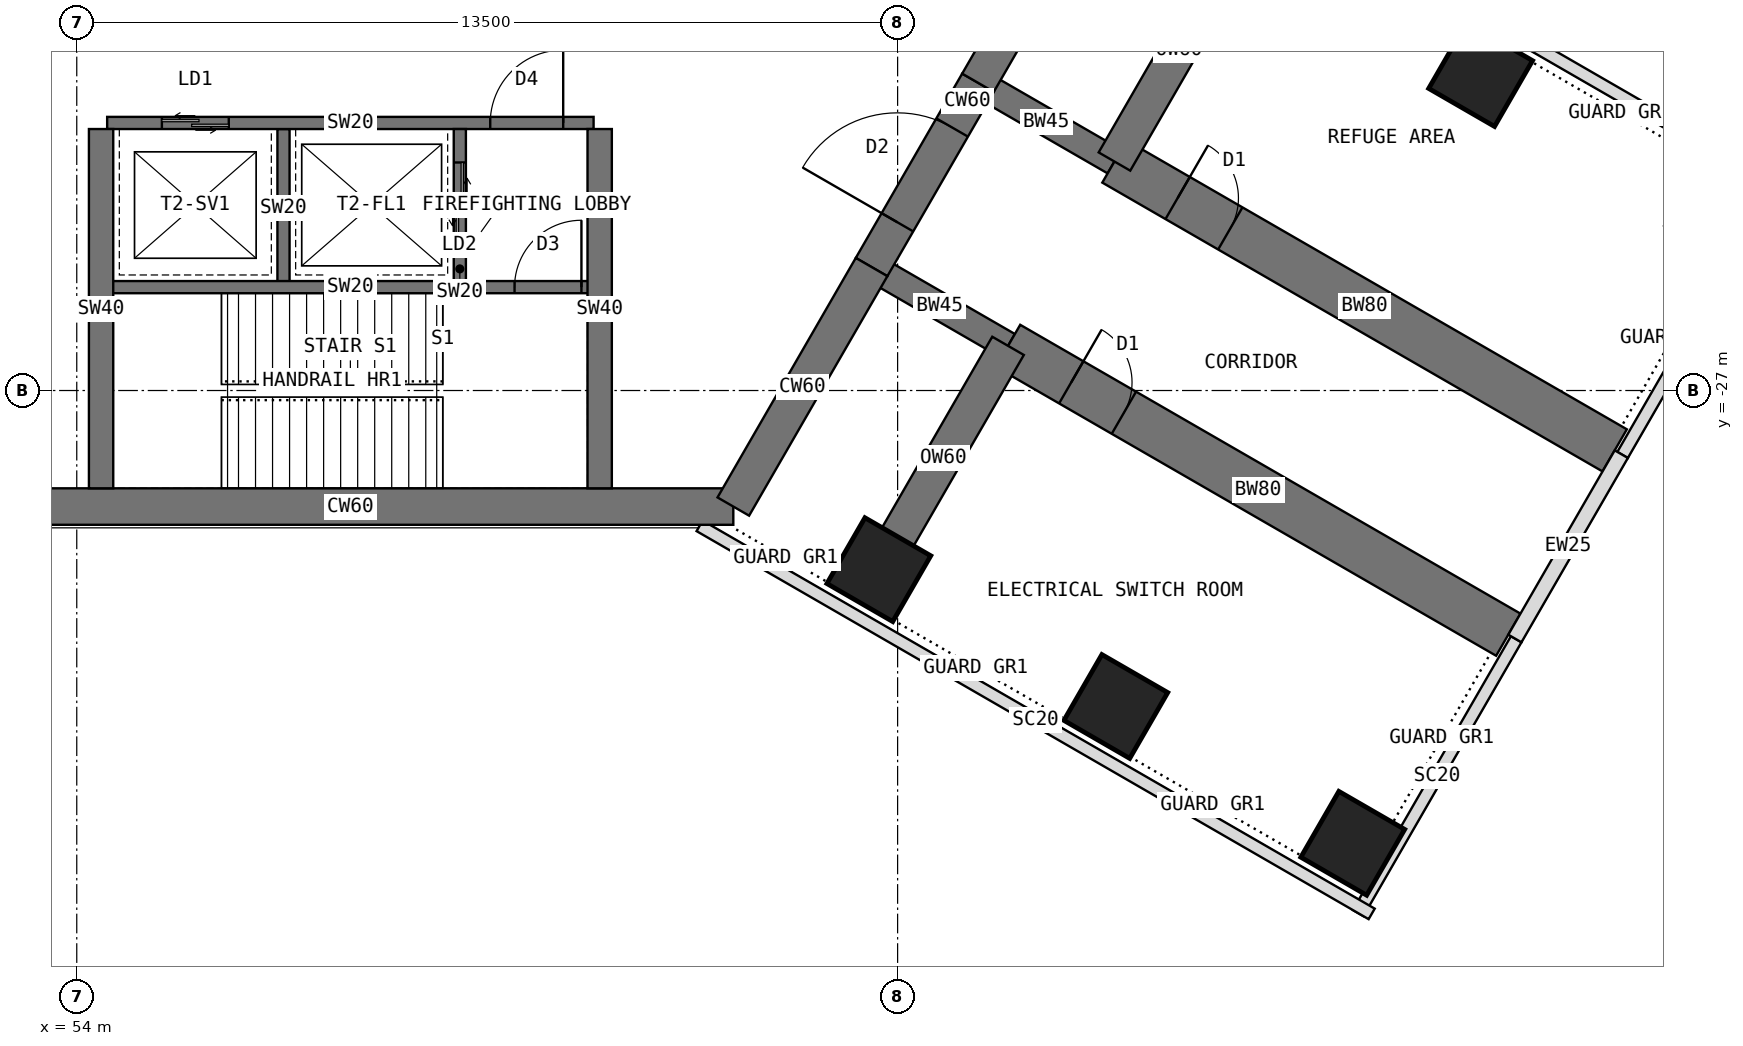
"""IFC4 building model, lengths in metres.
Left out: names, types, materials, properties, quantities, classifications, styles, units other than length and angle.
Written with IfcOpenShell. Run it as: python <this file> out.ifc"""

import sys

from ifc_helpers import new_model, si_unit, direction, frame, frame_2d, origin, origin_2d, place, context, subcontext, project, spatial, rectangle, extrude, element, fill, save


model = new_model("IFC4")
c1 = context("Model", 3, precision=1e-05, world=origin(), true_north=direction((0.0, 1.0)))
c2 = subcontext(c1, "Body", "Model", "MODEL_VIEW")
j1 = project(units=[si_unit("LENGTHUNIT", "METRE"), si_unit("PLANEANGLEUNIT", "RADIAN")], contexts=[c1])
p1 = place(None, origin())
s1 = spatial("IfcSite", under=j1, at=p1, CompositionType="ELEMENT")
p2 = place(p1, origin())
s2 = spatial("IfcBuilding", under=s1, at=p2, CompositionType="ELEMENT")
p3 = place(p2, frame((0.0, 0.0, 165.5)))
s3 = spatial("IfcBuildingStorey", under=s2, at=p3, CompositionType="ELEMENT", Elevation=165.5)
p4 = place(p3, frame((52.202, -28.908, 0.0), z_axis=(0.0, 0.0, 1.0), x_axis=(1.0, 0.0, 0.0)))
e1 = element("IfcWall", 1, at=p4, inside=s3, PredefinedType="SHEAR", context=c2, shape_type="SweptSolid", body=[
    extrude(rectangle(XDim=12.596, YDim=0.6, at=frame_2d((6.298, 0.0))), origin(), (0.0, 0.0, 1.0), 5.0),
])
p5 = place(p3, frame((64.798, -28.908, 0.0), z_axis=(0.0, 0.0, 1.0), x_axis=(0.499984222037, 0.866034513004, 0.0)))
e2 = element("IfcWall", 2, at=p5, inside=s3, PredefinedType="SHEAR", context=c2, shape_type="SweptSolid", body=[
    extrude(rectangle(XDim=4.548, YDim=0.6, at=frame_2d((2.274, 0.0))), origin(), (0.0, 0.0, 1.0), 5.0),
])
p6 = place(p3, frame((67.072, -24.97, 0.0), z_axis=(0.0, 0.0, 1.0), x_axis=(0.500010275428, 0.866019471182, 0.0)))
e3 = element("IfcWall", 3, at=p6, inside=s3, PredefinedType="SHEAR", context=c2, shape_type="SweptSolid", body=[
    extrude(rectangle(XDim=3.5, YDim=0.6, at=frame_2d((1.75, 0.0))), origin(), (0.0, 0.0, 1.0), 5.0),
])
p7 = place(p6, frame((0.85, 0.0, 0.0)))
e4 = element("IfcOpeningElement", 4, at=p7, cuts=e3, PredefinedType="OPENING", context=c2, shape_type="SweptSolid", body=[
    extrude(rectangle(XDim=1.8, YDim=2.1, at=frame_2d((0.9, 1.05))), frame((0.0, 0.31, 0.0), z_axis=(0.0, -1.0, 0.0), x_axis=(1.0, 0.0, 0.0)), (0.0, 0.0, 1.0), 0.62),
])
p8 = place(p3, frame((68.822, -21.939, 0.0), z_axis=(0.0, 0.0, 1.0), x_axis=(0.500024481964, 0.866011268655, 0.0)))
e5 = element("IfcWall", 5, at=p8, inside=s3, PredefinedType="SHEAR", context=c2, shape_type="SweptSolid", body=[
    extrude(rectangle(XDim=4.548, YDim=0.6, at=frame_2d((2.274, 0.0))), origin(), (0.0, 0.0, 1.0), 5.0),
])
p9 = place(p3, frame((68.822, -21.939, 0.0), z_axis=(0.0, 0.0, 1.0), x_axis=(0.866072649678, -0.499918158782, 0.0)))
e6 = element("IfcWall", 6, at=p9, inside=s3, PredefinedType="SHEAR", context=c2, shape_type="SweptSolid", body=[
    extrude(rectangle(XDim=2.592, YDim=0.45, at=frame_2d((1.296, 0.0))), origin(), (0.0, 0.0, 1.0), 5.0),
])
p10 = place(p3, frame((71.066, -23.234, 0.0), z_axis=(0.0, 0.0, 1.0), x_axis=(0.86602681393, -0.499997557548, 0.0)))
e7 = element("IfcWall", 7, at=p10, inside=s3, PredefinedType="SHEAR", context=c2, shape_type="SweptSolid", body=[
    extrude(rectangle(XDim=9.5, YDim=0.8, at=frame_2d((4.75, 0.0))), origin(), (0.0, 0.0, 1.0), 5.0),
])
p11 = place(p10, frame((1.2, 0.0, 0.0)))
e8 = element("IfcOpeningElement", 8, at=p11, cuts=e7, PredefinedType="OPENING", context=c2, shape_type="SweptSolid", body=[
    extrude(rectangle(XDim=1.0, YDim=2.1, at=frame_2d((0.5, 1.05))), frame((0.0, 0.41, 0.0), z_axis=(0.0, -1.0, 0.0), x_axis=(1.0, 0.0, 0.0)), (0.0, 0.0, 1.0), 0.82),
])
p12 = place(p3, frame((67.072, -24.97, 0.0), z_axis=(0.0, 0.0, 1.0), x_axis=(0.866031863473, -0.499988811324, 0.0)))
e9 = element("IfcWall", 9, at=p12, inside=s3, PredefinedType="SHEAR", context=c2, shape_type="SweptSolid", body=[
    extrude(rectangle(XDim=2.592, YDim=0.45, at=frame_2d((1.296, 0.0))), origin(), (0.0, 0.0, 1.0), 5.0),
])
p13 = place(p3, frame((69.316, -26.266, 0.0), z_axis=(0.0, 0.0, 1.0), x_axis=(0.86602681393, -0.499997557548, 0.0)))
e10 = element("IfcWall", 10, at=p13, inside=s3, PredefinedType="SHEAR", context=c2, shape_type="SweptSolid", body=[
    extrude(rectangle(XDim=9.5, YDim=0.8, at=frame_2d((4.75, 0.0))), origin(), (0.0, 0.0, 1.0), 5.0),
])
p14 = place(p13, frame((1.2, 0.0, 0.0)))
e11 = element("IfcOpeningElement", 11, at=p14, cuts=e10, PredefinedType="OPENING", context=c2, shape_type="SweptSolid", body=[
    extrude(rectangle(XDim=1.0, YDim=2.1, at=frame_2d((0.5, 1.05))), frame((0.0, 0.41, 0.0), z_axis=(0.0, -1.0, 0.0), x_axis=(1.0, 0.0, 0.0)), (0.0, 0.0, 1.0), 0.82),
])
for number, where, z_axis, x_axis in (
    (12, (67.191, -29.946, 0.0), (0.0, 0.0, 1.0), (0.5, 0.866, 0.0)),
    (13, (77.088, -21.804, 0.0), (0.0, 0.0, 1.0), (0.5, 0.866, 0.0)),
    (14, (71.088, -32.196, 0.0), (0.0, 0.0, 1.0), (0.5, 0.866, 0.0)),
    (15, (74.986, -34.446, 0.0), (0.0, 0.0, 1.0), (0.5, 0.866, 0.0)),
):
    element("IfcColumn", number, at=place(p3, frame(where, z_axis=z_axis, x_axis=x_axis)), inside=s3, PredefinedType="COLUMN", context=c2, shape_type="SweptSolid", body=[
        extrude(rectangle(XDim=1.25, YDim=1.25, at=origin_2d()), origin(), (0.0, 0.0, 1.0), 5.0),
    ])
for number, where, z_axis, x_axis in (
    (16, (71.066, -23.234, 0.0), (0.0, 0.0, 1.0), (0.5, 0.866, 0.0)),
    (17, (69.316, -26.266, 0.0), (0.0, 0.0, 1.0), (-0.5, -0.866, 0.0)),
):
    element("IfcWall", number, at=place(p3, frame(where, z_axis=z_axis, x_axis=x_axis)), inside=s3, PredefinedType="SHEAR", context=c2, shape_type="SweptSolid", body=[
        extrude(rectangle(XDim=4.25, YDim=0.6, at=frame_2d((2.125, 0.0))), origin(), (0.0, 0.0, 1.0), 5.0),
    ])
for number, where, z_axis, x_axis in (
    (18, (71.094, -17.361, 0.0), (0.0, 0.0, 1.0), (0.866, -0.5, 0.0)),
    (19, (75.297, -35.607, 0.0), (0.0, 0.0, 1.0), (-0.866, 0.5, 0.0)),
):
    element("IfcWall", number, at=place(p3, frame(where, z_axis=z_axis, x_axis=x_axis)), inside=s3, PredefinedType="USERDEFINED", context=c2, shape_type="SweptSolid", body=[
        extrude(rectangle(XDim=12.763, YDim=0.2, at=frame_2d((6.381, 0.0))), origin(), (0.0, 0.0, 1.0), 4.8),
    ])
p15 = place(p3, frame((75.073, -35.594, 0.0), z_axis=(0.0, 0.0, 1.0), x_axis=(0.500006934395, 0.866021400173, 0.0)))
e20 = element("IfcWall", 20, at=p15, inside=s3, PredefinedType="USERDEFINED", context=c2, shape_type="SweptSolid", body=[
    extrude(rectangle(XDim=5.2, YDim=0.2, at=frame_2d((2.6, 0.0))), origin(), (0.0, 0.0, 1.0), 4.8),
])
p16 = place(p3, frame((77.652, -31.078, 0.0), z_axis=(0.0, 0.0, 1.0), x_axis=(0.499980071345, 0.866036909293, 0.0)))
e21 = element("IfcWall", 21, at=p16, inside=s3, PredefinedType="STANDARD", context=c2, shape_type="SweptSolid", body=[
    extrude(rectangle(XDim=3.5, YDim=0.25, at=frame_2d((1.75, 0.0))), origin(), (0.0, 0.0, 1.0), 4.8),
])
p17 = place(p3, frame((79.424, -28.06, 0.0), z_axis=(0.0, 0.0, 1.0), x_axis=(0.499971721724, 0.866041729639, 0.0)))
e22 = element("IfcWall", 22, at=p17, inside=s3, PredefinedType="USERDEFINED", context=c2, shape_type="SweptSolid", body=[
    extrude(rectangle(XDim=5.2, YDim=0.2, at=frame_2d((2.6, 0.0))), origin(), (0.0, 0.0, 1.0), 4.8),
])
p18 = place(p3, frame((54.5, -22.6, 0.0), z_axis=(0.0, 0.0, 1.0), x_axis=(1.0, 0.0, 0.0)))
e23 = element("IfcWall", 23, at=p18, inside=s3, PredefinedType="SHEAR", context=c2, shape_type="SweptSolid", body=[
    extrude(rectangle(XDim=8.0, YDim=0.2, at=frame_2d((4.0, 0.0))), origin(), (0.0, 0.0, 1.0), 5.0),
])
p19 = place(p18, frame((6.3, 0.0, 0.0)))
e24 = element("IfcOpeningElement", 24, at=p19, cuts=e23, PredefinedType="OPENING", context=c2, shape_type="SweptSolid", body=[
    extrude(rectangle(XDim=1.2, YDim=2.1, at=frame_2d((0.6, 1.05))), frame((0.0, 0.11, 0.0), z_axis=(0.0, -1.0, 0.0), x_axis=(1.0, 0.0, 0.0)), (0.0, 0.0, 1.0), 0.22),
])
p20 = place(p18, frame((0.9, 0.0, 0.0)))
e25 = element("IfcOpeningElement", 25, at=p20, cuts=e23, PredefinedType="OPENING", context=c2, shape_type="SweptSolid", body=[
    extrude(rectangle(XDim=1.1, YDim=2.2, at=frame_2d((0.55, 1.1))), frame((0.0, 0.11, 0.0), z_axis=(0.0, -1.0, 0.0), x_axis=(1.0, 0.0, 0.0)), (0.0, 0.0, 1.0), 0.22),
])
p21 = place(p3, frame((57.4, -22.7, 0.0), z_axis=(0.0, 0.0, 1.0), x_axis=(0.0, -1.0, 0.0)))
e26 = element("IfcWall", 26, at=p21, inside=s3, PredefinedType="SHEAR", context=c2, shape_type="SweptSolid", body=[
    extrude(rectangle(XDim=2.6, YDim=0.2, at=frame_2d((1.3, 0.0))), origin(), (0.0, 0.0, 1.0), 5.0),
])
p22 = place(p3, frame((60.3, -22.7, 0.0), z_axis=(0.0, 0.0, 1.0), x_axis=(0.0, -1.0, 0.0)))
e27 = element("IfcWall", 27, at=p22, inside=s3, PredefinedType="SHEAR", context=c2, shape_type="SweptSolid", body=[
    extrude(rectangle(XDim=2.6, YDim=0.2, at=frame_2d((1.3, 0.0))), origin(), (0.0, 0.0, 1.0), 5.0),
])
p23 = place(p22, frame((0.55, 0.0, 0.0)))
e28 = element("IfcOpeningElement", 28, at=p23, cuts=e27, PredefinedType="OPENING", context=c2, shape_type="SweptSolid", body=[
    extrude(rectangle(XDim=1.3, YDim=2.2, at=frame_2d((0.65, 1.1))), frame((0.0, 0.11, 0.0), z_axis=(0.0, -1.0, 0.0), x_axis=(1.0, 0.0, 0.0)), (0.0, 0.0, 1.0), 0.22),
])
p24 = place(p3, frame((54.5, -25.3, 0.0), z_axis=(0.0, 0.0, 1.0), x_axis=(1.0, 0.0, 0.0)))
e29 = element("IfcWall", 29, at=p24, inside=s3, PredefinedType="SHEAR", context=c2, shape_type="SweptSolid", body=[
    extrude(rectangle(XDim=8.0, YDim=0.2, at=frame_2d((4.0, 0.0))), origin(), (0.0, 0.0, 1.0), 5.0),
])
p25 = place(p24, frame((6.7, 0.0, 0.0)))
e30 = element("IfcOpeningElement", 30, at=p25, cuts=e29, PredefinedType="OPENING", context=c2, shape_type="SweptSolid", body=[
    extrude(rectangle(XDim=1.1, YDim=2.1, at=frame_2d((0.55, 1.05))), frame((0.0, 0.11, 0.0), z_axis=(0.0, -1.0, 0.0), x_axis=(1.0, 0.0, 0.0)), (0.0, 0.0, 1.0), 0.22),
])
for number, where, z_axis, x_axis in (
    (31, (62.6, -22.7, 0.0), (0.0, 0.0, 1.0), (0.0, -1.0, 0.0)),
    (32, (54.4, -22.7, 0.0), (0.0, 0.0, 1.0), (0.0, -1.0, 0.0)),
):
    element("IfcWall", number, at=place(p3, frame(where, z_axis=z_axis, x_axis=x_axis)), inside=s3, PredefinedType="SHEAR", context=c2, shape_type="SweptSolid", body=[
        extrude(rectangle(XDim=5.908, YDim=0.4, at=frame_2d((2.954, 0.0))), origin(), (0.0, 0.0, 1.0), 5.0),
    ])
p26 = place(p19, origin())
e33 = element("IfcDoor", 33, at=p26, inside=s3, OperationType="SINGLE_SWING_RIGHT", PredefinedType="DOOR", context=c2, shape_type="SweptSolid", body=[
    extrude(rectangle(XDim=1.2, YDim=2.1, at=frame_2d((0.6, 1.05))), frame((0.0, 0.025, 0.0), z_axis=(0.0, -1.0, 0.0), x_axis=(1.0, 0.0, 0.0)), (0.0, 0.0, 1.0), 0.05),
])
fill(e24, e33)
p27 = place(p23, origin())
e34 = element("IfcDoor", 34, at=p27, inside=s3, OperationType="DOUBLE_DOOR_SLIDING", PredefinedType="DOOR", context=c2, shape_type="SweptSolid", body=[
    extrude(rectangle(XDim=1.3, YDim=2.2, at=frame_2d((0.65, 1.1))), frame((0.0, 0.025, 0.0), z_axis=(0.0, -1.0, 0.0), x_axis=(1.0, 0.0, 0.0)), (0.0, 0.0, 1.0), 0.05),
])
fill(e28, e34)
p28 = place(p20, origin())
e35 = element("IfcDoor", 35, at=p28, inside=s3, OperationType="DOUBLE_DOOR_SLIDING", PredefinedType="DOOR", context=c2, shape_type="SweptSolid", body=[
    extrude(rectangle(XDim=1.1, YDim=2.2, at=frame_2d((0.55, 1.1))), frame((0.0, 0.025, 0.0), z_axis=(0.0, -1.0, 0.0), x_axis=(1.0, 0.0, 0.0)), (0.0, 0.0, 1.0), 0.05),
])
fill(e25, e35)
p29 = place(p25, origin())
e36 = element("IfcDoor", 36, at=p29, inside=s3, OperationType="SINGLE_SWING_RIGHT", PredefinedType="DOOR", context=c2, shape_type="SweptSolid", body=[
    extrude(rectangle(XDim=1.1, YDim=2.1, at=frame_2d((0.55, 1.05))), frame((0.0, 0.025, 0.0), z_axis=(0.0, -1.0, 0.0), x_axis=(1.0, 0.0, 0.0)), (0.0, 0.0, 1.0), 0.05),
])
fill(e30, e36)
p30 = place(p7, origin())
e37 = element("IfcDoor", 37, at=p30, inside=s3, OperationType="DOUBLE_DOOR_DOUBLE_SWING", PredefinedType="DOOR", context=c2, shape_type="SweptSolid", body=[
    extrude(rectangle(XDim=1.72, YDim=2.06, at=frame_2d((0.9, 1.03))), frame((0.0, 0.025, 0.0), z_axis=(0.0, -1.0, 0.0), x_axis=(1.0, 0.0, 0.0)), (0.0, 0.0, 1.0), 0.05),
    extrude(rectangle(XDim=0.04, YDim=2.1, at=frame_2d((0.02, 1.05))), frame((0.0, 0.3, 0.0), z_axis=(0.0, -1.0, 0.0), x_axis=(1.0, 0.0, 0.0)), (0.0, 0.0, 1.0), 0.6),
    extrude(rectangle(XDim=0.04, YDim=2.1, at=frame_2d((1.78, 1.05))), frame((0.0, 0.3, 0.0), z_axis=(0.0, -1.0, 0.0), x_axis=(1.0, 0.0, 0.0)), (0.0, 0.0, 1.0), 0.6),
    extrude(rectangle(XDim=1.72, YDim=0.04, at=frame_2d((0.9, 2.08))), frame((0.0, 0.3, 0.0), z_axis=(0.0, -1.0, 0.0), x_axis=(1.0, 0.0, 0.0)), (0.0, 0.0, 1.0), 0.6),
])
fill(e4, e37)
p31 = place(p11, origin())
e38 = element("IfcDoor", 38, at=p31, inside=s3, OperationType="SINGLE_SWING_LEFT", PredefinedType="DOOR", context=c2, shape_type="SweptSolid", body=[
    extrude(rectangle(XDim=0.92, YDim=2.06, at=frame_2d((0.5, 1.03))), frame((0.0, 0.025, 0.0), z_axis=(0.0, -1.0, 0.0), x_axis=(1.0, 0.0, 0.0)), (0.0, 0.0, 1.0), 0.05),
    extrude(rectangle(XDim=0.04, YDim=2.1, at=frame_2d((0.02, 1.05))), frame((0.0, 0.4, 0.0), z_axis=(0.0, -1.0, 0.0), x_axis=(1.0, 0.0, 0.0)), (0.0, 0.0, 1.0), 0.8),
    extrude(rectangle(XDim=0.04, YDim=2.1, at=frame_2d((0.98, 1.05))), frame((0.0, 0.4, 0.0), z_axis=(0.0, -1.0, 0.0), x_axis=(1.0, 0.0, 0.0)), (0.0, 0.0, 1.0), 0.8),
    extrude(rectangle(XDim=0.92, YDim=0.04, at=frame_2d((0.5, 2.08))), frame((0.0, 0.4, 0.0), z_axis=(0.0, -1.0, 0.0), x_axis=(1.0, 0.0, 0.0)), (0.0, 0.0, 1.0), 0.8),
])
fill(e8, e38)
p32 = place(p14, origin())
e39 = element("IfcDoor", 39, at=p32, inside=s3, OperationType="SINGLE_SWING_LEFT", PredefinedType="DOOR", context=c2, shape_type="SweptSolid", body=[
    extrude(rectangle(XDim=0.92, YDim=2.06, at=frame_2d((0.5, 1.03))), frame((0.0, 0.025, 0.0), z_axis=(0.0, -1.0, 0.0), x_axis=(1.0, 0.0, 0.0)), (0.0, 0.0, 1.0), 0.05),
    extrude(rectangle(XDim=0.04, YDim=2.1, at=frame_2d((0.02, 1.05))), frame((0.0, 0.4, 0.0), z_axis=(0.0, -1.0, 0.0), x_axis=(1.0, 0.0, 0.0)), (0.0, 0.0, 1.0), 0.8),
    extrude(rectangle(XDim=0.04, YDim=2.1, at=frame_2d((0.98, 1.05))), frame((0.0, 0.4, 0.0), z_axis=(0.0, -1.0, 0.0), x_axis=(1.0, 0.0, 0.0)), (0.0, 0.0, 1.0), 0.8),
    extrude(rectangle(XDim=0.92, YDim=0.04, at=frame_2d((0.5, 2.08))), frame((0.0, 0.4, 0.0), z_axis=(0.0, -1.0, 0.0), x_axis=(1.0, 0.0, 0.0)), (0.0, 0.0, 1.0), 0.8),
])
fill(e11, e39)
save(model, sys.argv[1])
